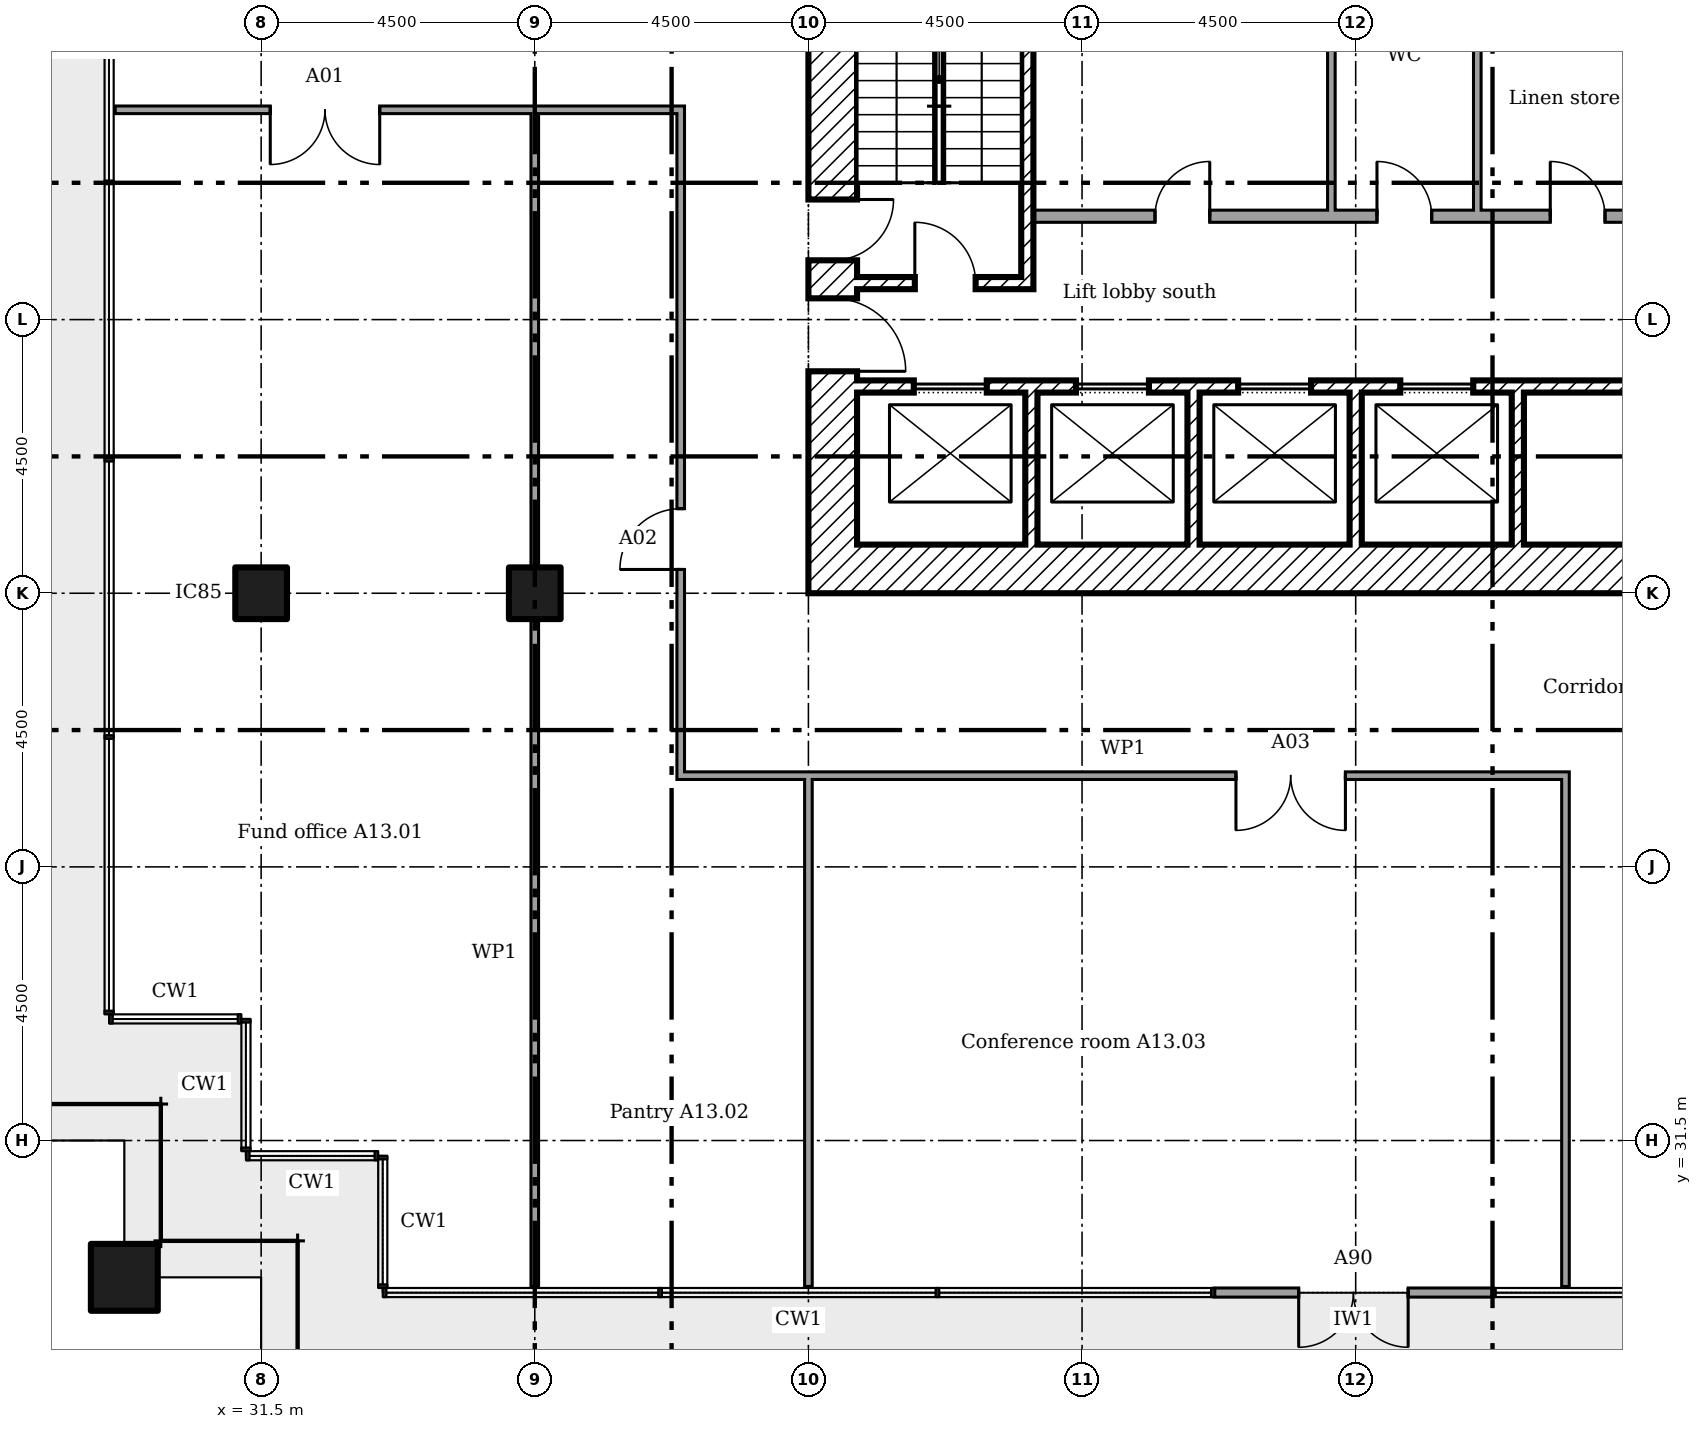
"""IFC4 building model, lengths in metres.
Left out: names, types, materials, properties, quantities, classifications, styles, units other than length and angle.
Written with IfcOpenShell. Run it as: python <this file> out.ifc"""

import sys

from ifc_helpers import new_model, si_unit, direction, frame, frame_2d, origin, origin_2d, place, context, subcontext, project, spatial, rectangle, extrude, element, fill, save


model = new_model("IFC4")
c1 = context("Model", 3, precision=1e-05, world=origin(), true_north=direction((0.0, 1.0)))
c2 = subcontext(c1, "Body", "Model", "MODEL_VIEW")
j1 = project(units=[si_unit("LENGTHUNIT", "METRE"), si_unit("PLANEANGLEUNIT", "RADIAN")], contexts=[c1])
p1 = place(None, origin())
s1 = spatial("IfcSite", under=j1, at=p1, CompositionType="ELEMENT")
p2 = place(p1, origin())
s2 = spatial("IfcBuilding", under=s1, at=p2, CompositionType="ELEMENT")
p3 = place(p2, frame((0.0, 0.0, 58.2)))
s3 = spatial("IfcBuildingStorey", under=s2, at=p3, CompositionType="ELEMENT", Elevation=58.2)
p4 = place(p3, frame((29.25, 29.25, 0.0)))
e1 = element("IfcColumn", 1, at=p4, inside=s3, PredefinedType="COLUMN", context=c2, shape_type="SweptSolid", body=[
    extrude(rectangle(XDim=1.1, YDim=1.1, at=origin_2d()), origin(), (0.0, 0.0, 1.0), 3.6),
])
for number, where in (
    (2, (31.5, 40.5, 0.0)),
    (3, (36.0, 40.5, 0.0)),
):
    element("IfcColumn", number, at=place(p3, frame(where)), inside=s3, PredefinedType="COLUMN", context=c2, shape_type="SweptSolid", body=[
        extrude(rectangle(XDim=0.85, YDim=0.85, at=origin_2d()), origin(), (0.0, 0.0, 1.0), 3.6),
    ])
p5 = place(p3, frame((47.182, 29.0, 0.0)))
e4 = element("IfcWall", 4, at=p5, inside=s3, PredefinedType="SOLIDWALL", context=c2, shape_type="SweptSolid", body=[
    extrude(rectangle(XDim=4.561, YDim=0.15, at=frame_2d((2.28, 0.0))), origin(), (0.0, 0.0, 1.0), 3.45),
])
p6 = place(p5, frame((1.38, 0.0, 0.0)))
e5 = element("IfcOpeningElement", 5, at=p6, cuts=e4, PredefinedType="OPENING", context=c2, shape_type="SweptSolid", body=[
    extrude(rectangle(XDim=1.8, YDim=2.4, at=frame_2d((0.9, 1.2))), frame((0.0, 0.085, 0.0), z_axis=(0.0, -1.0, 0.0), x_axis=(1.0, 0.0, 0.0)), (0.0, 0.0, 1.0), 0.17),
])
p7 = place(p3, frame((41.3, 40.9, 0.0)))
e6 = element("IfcWall", 6, at=p7, inside=s3, PredefinedType="SHEAR", context=c2, shape_type="SweptSolid", body=[
    extrude(rectangle(XDim=16.4, YDim=0.8, at=frame_2d((8.2, 0.0))), origin(), (0.0, 0.0, 1.0), 3.35),
])
p8 = place(p3, frame((40.9, 40.5, 0.0), z_axis=(0.0, 0.0, 1.0), x_axis=(0.0, 1.0, 0.0)))
e7 = element("IfcWall", 7, at=p8, inside=s3, PredefinedType="SHEAR", context=c2, shape_type="SweptSolid", body=[
    extrude(rectangle(XDim=18.0, YDim=0.8, at=frame_2d((9.0, 0.0))), origin(), (0.0, 0.0, 1.0), 3.35),
])
p9 = place(p8, frame((3.65, 0.0, 0.0)))
e8 = element("IfcOpeningElement", 8, at=p9, cuts=e7, PredefinedType="OPENING", context=c2, shape_type="SweptSolid", body=[
    extrude(rectangle(XDim=1.2, YDim=2.1, at=frame_2d((0.6, 1.05))), frame((0.0, 0.41, 0.0), z_axis=(0.0, -1.0, 0.0), x_axis=(1.0, 0.0, 0.0)), (0.0, 0.0, 1.0), 0.82),
])
p10 = place(p8, frame((5.475, 0.0, 0.0)))
e9 = element("IfcOpeningElement", 9, at=p10, cuts=e7, PredefinedType="OPENING", context=c2, shape_type="SweptSolid", body=[
    extrude(rectangle(XDim=1.0, YDim=2.1, at=frame_2d((0.5, 1.05))), frame((0.0, 0.41, 0.0), z_axis=(0.0, -1.0, 0.0), x_axis=(1.0, 0.0, 0.0)), (0.0, 0.0, 1.0), 0.82),
])
p11 = place(p8, frame((12.3, 0.0, 0.0)))
e10 = element("IfcOpeningElement", 10, at=p11, cuts=e7, PredefinedType="OPENING", context=c2, shape_type="SweptSolid", body=[
    extrude(rectangle(XDim=1.0, YDim=2.1, at=frame_2d((0.5, 1.05))), frame((0.0, 0.41, 0.0), z_axis=(0.0, -1.0, 0.0), x_axis=(1.0, 0.0, 0.0)), (0.0, 0.0, 1.0), 0.82),
])
for number, where, z_axis, x_axis in (
    (11, (44.167, 41.3, 0.0), (0.0, 0.0, 1.0), (0.0, 1.0, 0.0)),
    (12, (46.833, 41.3, 0.0), (0.0, 0.0, 1.0), (0.0, 1.0, 0.0)),
    (13, (49.5, 41.3, 0.0), (0.0, 0.0, 1.0), (0.0, 1.0, 0.0)),
    (14, (52.167, 41.3, 0.0), (0.0, 0.0, 1.0), (0.0, 1.0, 0.0)),
):
    element("IfcWall", number, at=place(p3, frame(where, z_axis=z_axis, x_axis=x_axis)), inside=s3, PredefinedType="SHEAR", context=c2, shape_type="SweptSolid", body=[
        extrude(rectangle(XDim=2.5, YDim=0.2, at=frame_2d((1.25, 0.0))), origin(), (0.0, 0.0, 1.0), 3.35),
    ])
p12 = place(p3, frame((41.3, 43.9, 0.0)))
e15 = element("IfcWall", 15, at=p12, inside=s3, PredefinedType="SHEAR", context=c2, shape_type="SweptSolid", body=[
    extrude(rectangle(XDim=16.4, YDim=0.2, at=frame_2d((8.2, 0.0))), origin(), (0.0, 0.0, 1.0), 3.35),
])
p13 = place(p12, frame((0.933, 0.0, 0.0)))
e16 = element("IfcOpeningElement", 16, at=p13, cuts=e15, PredefinedType="OPENING", context=c2, shape_type="SweptSolid", body=[
    extrude(rectangle(XDim=1.2, YDim=2.1, at=frame_2d((0.6, 1.05))), frame((0.0, 0.11, 0.0), z_axis=(0.0, -1.0, 0.0), x_axis=(1.0, 0.0, 0.0)), (0.0, 0.0, 1.0), 0.22),
])
p14 = place(p12, frame((3.6, 0.0, 0.0)))
e17 = element("IfcOpeningElement", 17, at=p14, cuts=e15, PredefinedType="OPENING", context=c2, shape_type="SweptSolid", body=[
    extrude(rectangle(XDim=1.2, YDim=2.1, at=frame_2d((0.6, 1.05))), frame((0.0, 0.11, 0.0), z_axis=(0.0, -1.0, 0.0), x_axis=(1.0, 0.0, 0.0)), (0.0, 0.0, 1.0), 0.22),
])
p15 = place(p12, frame((6.267, 0.0, 0.0)))
e18 = element("IfcOpeningElement", 18, at=p15, cuts=e15, PredefinedType="OPENING", context=c2, shape_type="SweptSolid", body=[
    extrude(rectangle(XDim=1.2, YDim=2.1, at=frame_2d((0.6, 1.05))), frame((0.0, 0.11, 0.0), z_axis=(0.0, -1.0, 0.0), x_axis=(1.0, 0.0, 0.0)), (0.0, 0.0, 1.0), 0.22),
])
p16 = place(p12, frame((8.933, 0.0, 0.0)))
e19 = element("IfcOpeningElement", 19, at=p16, cuts=e15, PredefinedType="OPENING", context=c2, shape_type="SweptSolid", body=[
    extrude(rectangle(XDim=1.2, YDim=2.1, at=frame_2d((0.6, 1.05))), frame((0.0, 0.11, 0.0), z_axis=(0.0, -1.0, 0.0), x_axis=(1.0, 0.0, 0.0)), (0.0, 0.0, 1.0), 0.22),
])
p17 = place(p3, frame((44.1, 45.5, 0.0), z_axis=(0.0, 0.0, 1.0), x_axis=(0.0, 1.0, 0.0)))
e20 = element("IfcWall", 20, at=p17, inside=s3, PredefinedType="SHEAR", context=c2, shape_type="SweptSolid", body=[
    extrude(rectangle(XDim=6.9, YDim=0.2, at=frame_2d((3.45, 0.0))), origin(), (0.0, 0.0, 1.0), 3.35),
])
p18 = place(p3, frame((41.3, 45.6, 0.0)))
e21 = element("IfcWall", 21, at=p18, inside=s3, PredefinedType="SHEAR", context=c2, shape_type="SweptSolid", body=[
    extrude(rectangle(XDim=2.7, YDim=0.2, at=frame_2d((1.35, 0.0))), origin(), (0.0, 0.0, 1.0), 3.35),
])
p19 = place(p18, frame((0.95, 0.0, 0.0)))
e22 = element("IfcOpeningElement", 22, at=p19, cuts=e21, PredefinedType="OPENING", context=c2, shape_type="SweptSolid", body=[
    extrude(rectangle(XDim=1.0, YDim=2.1, at=frame_2d((0.5, 1.05))), frame((0.0, 0.11, 0.0), z_axis=(0.0, -1.0, 0.0), x_axis=(1.0, 0.0, 0.0)), (0.0, 0.0, 1.0), 0.22),
])
p20 = place(p3, frame((44.2, 46.7, 0.0)))
e23 = element("IfcWall", 23, at=p20, inside=s3, PredefinedType="PARTITIONING", context=c2, shape_type="SweptSolid", body=[
    extrude(rectangle(XDim=10.6, YDim=0.2, at=frame_2d((5.3, 0.0))), origin(), (0.0, 0.0, 1.0), 3.35),
])
p21 = place(p20, frame((2.0, 0.0, 0.0)))
e24 = element("IfcOpeningElement", 24, at=p21, cuts=e23, PredefinedType="OPENING", context=c2, shape_type="SweptSolid", body=[
    extrude(rectangle(XDim=0.9, YDim=2.1, at=frame_2d((0.45, 1.05))), frame((0.0, 0.11, 0.0), z_axis=(0.0, -1.0, 0.0), x_axis=(1.0, 0.0, 0.0)), (0.0, 0.0, 1.0), 0.22),
])
p22 = place(p20, frame((5.65, 0.0, 0.0)))
e25 = element("IfcOpeningElement", 25, at=p22, cuts=e23, PredefinedType="OPENING", context=c2, shape_type="SweptSolid", body=[
    extrude(rectangle(XDim=0.9, YDim=2.1, at=frame_2d((0.45, 1.05))), frame((0.0, 0.11, 0.0), z_axis=(0.0, -1.0, 0.0), x_axis=(1.0, 0.0, 0.0)), (0.0, 0.0, 1.0), 0.22),
])
p23 = place(p20, frame((8.5, 0.0, 0.0)))
e26 = element("IfcOpeningElement", 26, at=p23, cuts=e23, PredefinedType="OPENING", context=c2, shape_type="SweptSolid", body=[
    extrude(rectangle(XDim=0.9, YDim=2.1, at=frame_2d((0.45, 1.05))), frame((0.0, 0.11, 0.0), z_axis=(0.0, -1.0, 0.0), x_axis=(1.0, 0.0, 0.0)), (0.0, 0.0, 1.0), 0.22),
])
p24 = place(p3, frame((49.1, 46.8, 0.0), z_axis=(0.0, 0.0, 1.0), x_axis=(0.0, 1.0, 0.0)))
e27 = element("IfcWall", 27, at=p24, inside=s3, PredefinedType="PARTITIONING", context=c2, shape_type="SweptSolid", body=[
    extrude(rectangle(XDim=5.0, YDim=0.125, at=frame_2d((2.5, 0.0))), origin(), (0.0, 0.0, 1.0), 3.35),
])
p25 = place(p3, frame((51.5, 46.8, 0.0), z_axis=(0.0, 0.0, 1.0), x_axis=(0.0, 1.0, 0.0)))
e28 = element("IfcWall", 28, at=p25, inside=s3, PredefinedType="PARTITIONING", context=c2, shape_type="SweptSolid", body=[
    extrude(rectangle(XDim=2.762, YDim=0.125, at=frame_2d((1.381, 0.0))), origin(), (0.0, 0.0, 1.0), 3.35),
])
p26 = place(p3, frame((38.337, 37.5, 0.0)))
e29 = element("IfcWall", 29, at=p26, inside=s3, PredefinedType="PARTITIONING", context=c2, shape_type="SweptSolid", body=[
    extrude(rectangle(XDim=14.675, YDim=0.125, at=frame_2d((7.337, 0.0))), origin(), (0.0, 0.0, 1.0), 3.45),
])
p27 = place(p26, frame((9.194, 0.0, 0.0)))
e30 = element("IfcOpeningElement", 30, at=p27, cuts=e29, PredefinedType="OPENING", context=c2, shape_type="SweptSolid", body=[
    extrude(rectangle(XDim=1.8, YDim=2.1, at=frame_2d((0.9, 1.05))), frame((0.0, 0.073, 0.0), z_axis=(0.0, -1.0, 0.0), x_axis=(1.0, 0.0, 0.0)), (0.0, 0.0, 1.0), 0.145),
])
p28 = place(p3, frame((29.1, 48.45, 0.0)))
e31 = element("IfcWall", 31, at=p28, inside=s3, PredefinedType="PARTITIONING", context=c2, shape_type="SweptSolid", body=[
    extrude(rectangle(XDim=9.362, YDim=0.125, at=frame_2d((4.681, 0.0))), origin(), (0.0, 0.0, 1.0), 3.45),
])
p29 = place(p28, frame((2.55, 0.0, 0.0)))
e32 = element("IfcOpeningElement", 32, at=p29, cuts=e31, PredefinedType="OPENING", context=c2, shape_type="SweptSolid", body=[
    extrude(rectangle(XDim=1.8, YDim=2.1, at=frame_2d((0.9, 1.05))), frame((0.0, 0.073, 0.0), z_axis=(0.0, -1.0, 0.0), x_axis=(1.0, 0.0, 0.0)), (0.0, 0.0, 1.0), 0.145),
])
p30 = place(p3, frame((36.0, 29.1, 0.0), z_axis=(0.0, 0.0, 1.0), x_axis=(0.0, 1.0, 0.0)))
e33 = element("IfcWall", 33, at=p30, inside=s3, PredefinedType="PARTITIONING", context=c2, shape_type="SweptSolid", body=[
    extrude(rectangle(XDim=10.975, YDim=0.125, at=frame_2d((5.487, 0.0))), origin(), (0.0, 0.0, 1.0), 2.766),
])
p31 = place(p3, frame((36.0, 40.925, 0.0), z_axis=(0.0, 0.0, 1.0), x_axis=(0.0, 1.0, 0.0)))
e34 = element("IfcWall", 34, at=p31, inside=s3, PredefinedType="PARTITIONING", context=c2, shape_type="SweptSolid", body=[
    extrude(rectangle(XDim=7.525, YDim=0.125, at=frame_2d((3.762, 0.0))), origin(), (0.0, 0.0, 1.0), 3.45),
])
p32 = place(p3, frame((38.4, 37.562, 0.0), z_axis=(0.0, 0.0, 1.0), x_axis=(0.0, 1.0, 0.0)))
e35 = element("IfcWall", 35, at=p32, inside=s3, PredefinedType="PARTITIONING", context=c2, shape_type="SweptSolid", body=[
    extrude(rectangle(XDim=10.825, YDim=0.125, at=frame_2d((5.413, 0.0))), origin(), (0.0, 0.0, 1.0), 3.45),
])
p33 = place(p32, frame((3.329, 0.0, 0.0)))
e36 = element("IfcOpeningElement", 36, at=p33, cuts=e35, PredefinedType="OPENING", context=c2, shape_type="SweptSolid", body=[
    extrude(rectangle(XDim=1.0, YDim=2.1, at=frame_2d((0.5, 1.05))), frame((0.0, 0.073, 0.0), z_axis=(0.0, -1.0, 0.0), x_axis=(1.0, 0.0, 0.0)), (0.0, 0.0, 1.0), 0.145),
])
p34 = place(p3, frame((40.5, 29.1, 0.0), z_axis=(0.0, 0.0, 1.0), x_axis=(0.0, 1.0, 0.0)))
e37 = element("IfcWall", 37, at=p34, inside=s3, PredefinedType="PARTITIONING", context=c2, shape_type="SweptSolid", body=[
    extrude(rectangle(XDim=8.4, YDim=0.125, at=frame_2d((4.2, 0.0))), origin(), (0.0, 0.0, 1.0), 2.766),
])
p35 = place(p3, frame((52.95, 29.1, 0.0), z_axis=(0.0, 0.0, 1.0), x_axis=(0.0, 1.0, 0.0)))
e38 = element("IfcWall", 38, at=p35, inside=s3, PredefinedType="PARTITIONING", context=c2, shape_type="SweptSolid", body=[
    extrude(rectangle(XDim=8.337, YDim=0.125, at=frame_2d((4.169, 0.0))), origin(), (0.0, 0.0, 1.0), 3.45),
])
p36 = place(p6, frame((1.8, 0.0, 0.0), x_axis=(-1.0, 0.0, 0.0)))
e39 = element("IfcDoor", 39, at=p36, inside=s3, OperationType="DOUBLE_DOOR_DOUBLE_SWING", PredefinedType="NOTDEFINED", context=c2, shape_type="SweptSolid", body=[
    extrude(rectangle(XDim=1.8, YDim=2.4, at=frame_2d((0.9, 1.2))), frame((0.0, 0.025, 0.0), z_axis=(0.0, -1.0, 0.0), x_axis=(1.0, 0.0, 0.0)), (0.0, 0.0, 1.0), 0.05),
])
fill(e5, e39)
p37 = place(p9, frame((1.2, 0.0, 0.0), x_axis=(-1.0, 0.0, 0.0)))
e40 = element("IfcDoor", 40, at=p37, inside=s3, OperationType="SINGLE_SWING_LEFT", PredefinedType="DOOR", context=c2, shape_type="SweptSolid", body=[
    extrude(rectangle(XDim=1.2, YDim=2.1, at=frame_2d((0.6, 1.05))), frame((0.0, 0.025, 0.0), z_axis=(0.0, -1.0, 0.0), x_axis=(1.0, 0.0, 0.0)), (0.0, 0.0, 1.0), 0.05),
])
fill(e8, e40)
p38 = place(p19, origin())
e41 = element("IfcDoor", 41, at=p38, inside=s3, OperationType="SINGLE_SWING_RIGHT", PredefinedType="DOOR", context=c2, shape_type="SweptSolid", body=[
    extrude(rectangle(XDim=1.0, YDim=2.1, at=frame_2d((0.5, 1.05))), frame((0.0, 0.025, 0.0), z_axis=(0.0, -1.0, 0.0), x_axis=(1.0, 0.0, 0.0)), (0.0, 0.0, 1.0), 0.05),
])
fill(e22, e41)
p39 = place(p10, frame((1.0, 0.0, 0.0), x_axis=(-1.0, 0.0, 0.0)))
e42 = element("IfcDoor", 42, at=p39, inside=s3, OperationType="SINGLE_SWING_RIGHT", PredefinedType="DOOR", context=c2, shape_type="SweptSolid", body=[
    extrude(rectangle(XDim=1.0, YDim=2.1, at=frame_2d((0.5, 1.05))), frame((0.0, 0.025, 0.0), z_axis=(0.0, -1.0, 0.0), x_axis=(1.0, 0.0, 0.0)), (0.0, 0.0, 1.0), 0.05),
])
fill(e9, e42)
p40 = place(p21, origin())
e43 = element("IfcDoor", 43, at=p40, inside=s3, OperationType="SINGLE_SWING_LEFT", PredefinedType="DOOR", context=c2, shape_type="SweptSolid", body=[
    extrude(rectangle(XDim=0.9, YDim=2.1, at=frame_2d((0.45, 1.05))), frame((0.0, 0.025, 0.0), z_axis=(0.0, -1.0, 0.0), x_axis=(1.0, 0.0, 0.0)), (0.0, 0.0, 1.0), 0.05),
])
fill(e24, e43)
p41 = place(p22, origin())
e44 = element("IfcDoor", 44, at=p41, inside=s3, OperationType="SINGLE_SWING_RIGHT", PredefinedType="DOOR", context=c2, shape_type="SweptSolid", body=[
    extrude(rectangle(XDim=0.9, YDim=2.1, at=frame_2d((0.45, 1.05))), frame((0.0, 0.025, 0.0), z_axis=(0.0, -1.0, 0.0), x_axis=(1.0, 0.0, 0.0)), (0.0, 0.0, 1.0), 0.05),
])
fill(e25, e44)
p42 = place(p23, origin())
e45 = element("IfcDoor", 45, at=p42, inside=s3, OperationType="SINGLE_SWING_RIGHT", PredefinedType="DOOR", context=c2, shape_type="SweptSolid", body=[
    extrude(rectangle(XDim=0.9, YDim=2.1, at=frame_2d((0.45, 1.05))), frame((0.0, 0.025, 0.0), z_axis=(0.0, -1.0, 0.0), x_axis=(1.0, 0.0, 0.0)), (0.0, 0.0, 1.0), 0.05),
])
fill(e26, e45)
p43 = place(p13, origin())
e46 = element("IfcDoor", 46, at=p43, inside=s3, OperationType="SLIDING_TO_LEFT", PredefinedType="DOOR", context=c2, shape_type="SweptSolid", body=[
    extrude(rectangle(XDim=1.2, YDim=2.1, at=frame_2d((0.6, 1.05))), frame((0.0, 0.025, 0.0), z_axis=(0.0, -1.0, 0.0), x_axis=(1.0, 0.0, 0.0)), (0.0, 0.0, 1.0), 0.05),
])
fill(e16, e46)
p44 = place(p14, origin())
e47 = element("IfcDoor", 47, at=p44, inside=s3, OperationType="SLIDING_TO_LEFT", PredefinedType="DOOR", context=c2, shape_type="SweptSolid", body=[
    extrude(rectangle(XDim=1.2, YDim=2.1, at=frame_2d((0.6, 1.05))), frame((0.0, 0.025, 0.0), z_axis=(0.0, -1.0, 0.0), x_axis=(1.0, 0.0, 0.0)), (0.0, 0.0, 1.0), 0.05),
])
fill(e17, e47)
p45 = place(p15, origin())
e48 = element("IfcDoor", 48, at=p45, inside=s3, OperationType="SLIDING_TO_LEFT", PredefinedType="DOOR", context=c2, shape_type="SweptSolid", body=[
    extrude(rectangle(XDim=1.2, YDim=2.1, at=frame_2d((0.6, 1.05))), frame((0.0, 0.025, 0.0), z_axis=(0.0, -1.0, 0.0), x_axis=(1.0, 0.0, 0.0)), (0.0, 0.0, 1.0), 0.05),
])
fill(e18, e48)
p46 = place(p16, origin())
e49 = element("IfcDoor", 49, at=p46, inside=s3, OperationType="SLIDING_TO_LEFT", PredefinedType="DOOR", context=c2, shape_type="SweptSolid", body=[
    extrude(rectangle(XDim=1.2, YDim=2.1, at=frame_2d((0.6, 1.05))), frame((0.0, 0.025, 0.0), z_axis=(0.0, -1.0, 0.0), x_axis=(1.0, 0.0, 0.0)), (0.0, 0.0, 1.0), 0.05),
])
fill(e19, e49)
p47 = place(p29, frame((1.8, 0.0, 0.0), x_axis=(-1.0, 0.0, 0.0)))
e50 = element("IfcDoor", 50, at=p47, inside=s3, OperationType="DOUBLE_DOOR_SINGLE_SWING", PredefinedType="DOOR", context=c2, shape_type="SweptSolid", body=[
    extrude(rectangle(XDim=1.8, YDim=2.1, at=frame_2d((0.9, 1.05))), frame((0.0, 0.025, 0.0), z_axis=(0.0, -1.0, 0.0), x_axis=(1.0, 0.0, 0.0)), (0.0, 0.0, 1.0), 0.05),
])
fill(e32, e50)
p48 = place(p33, origin())
e51 = element("IfcDoor", 51, at=p48, inside=s3, OperationType="SINGLE_SWING_RIGHT", PredefinedType="DOOR", context=c2, shape_type="SweptSolid", body=[
    extrude(rectangle(XDim=1.0, YDim=2.1, at=frame_2d((0.5, 1.05))), frame((0.0, 0.025, 0.0), z_axis=(0.0, -1.0, 0.0), x_axis=(1.0, 0.0, 0.0)), (0.0, 0.0, 1.0), 0.05),
])
fill(e36, e51)
p49 = place(p27, frame((1.8, 0.0, 0.0), x_axis=(-1.0, 0.0, 0.0)))
e52 = element("IfcDoor", 52, at=p49, inside=s3, OperationType="DOUBLE_DOOR_SINGLE_SWING", PredefinedType="DOOR", context=c2, shape_type="SweptSolid", body=[
    extrude(rectangle(XDim=1.8, YDim=2.1, at=frame_2d((0.9, 1.05))), frame((0.0, 0.025, 0.0), z_axis=(0.0, -1.0, 0.0), x_axis=(1.0, 0.0, 0.0)), (0.0, 0.0, 1.0), 0.05),
])
fill(e30, e52)
save(model, sys.argv[1])
